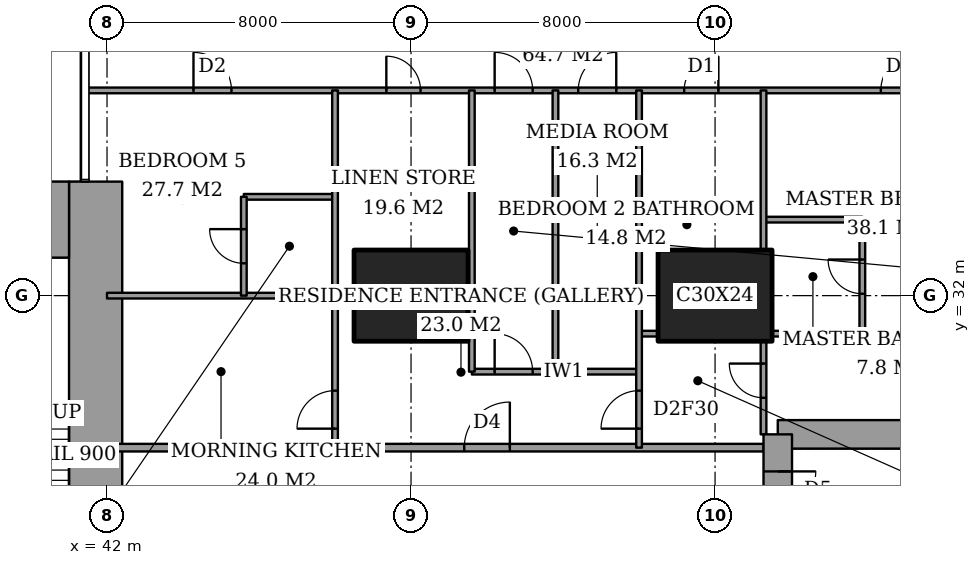
"""IFC4 building model, lengths in metres.
Left out: names, types, materials, properties, quantities, classifications, styles, units other than length and angle.
Written with IfcOpenShell. Run it as: python <this file> out.ifc"""

import sys

from ifc_helpers import new_model, si_unit, direction, frame, frame_2d, origin, origin_2d, place, context, subcontext, project, spatial, rectangle, extrude, element, fill, save


model = new_model("IFC4")
c1 = context("Model", 3, precision=1e-05, world=origin(), true_north=direction((0.0, 1.0)))
c2 = subcontext(c1, "Body", "Model", "MODEL_VIEW")
j1 = project(units=[si_unit("LENGTHUNIT", "METRE"), si_unit("PLANEANGLEUNIT", "RADIAN")], contexts=[c1])
p1 = place(None, origin())
s1 = spatial("IfcSite", under=j1, at=p1, CompositionType="ELEMENT")
p2 = place(p1, origin())
s2 = spatial("IfcBuilding", under=s1, at=p2, CompositionType="ELEMENT")
p3 = place(p2, frame((0.0, 0.0, 211.0)))
s3 = spatial("IfcBuildingStorey", under=s2, at=p3, CompositionType="ELEMENT", Elevation=211.0)
for number, where, z_axis, x_axis in (
    (1, (50.0, 32.0, 0.0), (0.0, 0.0, 1.0), (1.0, 0.0, 0.0)),
    (2, (58.0, 32.0, 0.0), (0.0, 0.0, 1.0), (1.0, 0.0, 0.0)),
):
    element("IfcColumn", number, at=place(p3, frame(where, z_axis=z_axis, x_axis=x_axis)), inside=s3, PredefinedType="COLUMN", context=c2, shape_type="SweptSolid", body=[
        extrude(rectangle(XDim=3.0, YDim=2.4, at=origin_2d()), origin(), (0.0, 0.0, 1.0), 3.6),
    ])
p4 = place(p3, frame((37.85, 34.0, 0.0), z_axis=(0.0, 0.0, 1.0), x_axis=(1.0, 0.0, 0.0)))
e3 = element("IfcWall", 3, at=p4, inside=s3, PredefinedType="SHEAR", context=c2, shape_type="SweptSolid", body=[
    extrude(rectangle(XDim=3.15, YDim=2.0, at=frame_2d((1.575, 0.0))), origin(), (0.0, 0.0, 1.0), 3.6),
])
p5 = place(p3, frame((41.7, 24.85, 0.0), z_axis=(0.0, 0.0, 1.0), x_axis=(0.0, 1.0, 0.0)))
e4 = element("IfcWall", 4, at=p5, inside=s3, PredefinedType="SHEAR", context=c2, shape_type="SweptSolid", body=[
    extrude(rectangle(XDim=10.15, YDim=1.4, at=frame_2d((5.075, 0.0))), origin(), (0.0, 0.0, 1.0), 3.6),
])
p6 = place(p3, frame((64.1, 28.35, 0.0), z_axis=(0.0, 0.0, 1.0), x_axis=(-1.0, 0.0, 0.0)))
e5 = element("IfcWall", 5, at=p6, inside=s3, PredefinedType="SHEAR", context=c2, shape_type="SweptSolid", body=[
    extrude(rectangle(XDim=4.45, YDim=0.75, at=frame_2d((2.225, 0.0))), origin(), (0.0, 0.0, 1.0), 3.6),
])
p7 = place(p3, frame((59.65, 28.35, 0.0), z_axis=(0.0, 0.0, 1.0), x_axis=(0.0, -1.0, 0.0)))
e6 = element("IfcWall", 6, at=p7, inside=s3, PredefinedType="SHEAR", context=c2, shape_type="SweptSolid", body=[
    extrude(rectangle(XDim=8.7, YDim=0.75, at=frame_2d((4.35, 0.0))), origin(), (0.0, 0.0, 1.0), 3.6),
])
p8 = place(p7, frame((0.975, 0.0, 0.0)))
e7 = element("IfcOpeningElement", 7, at=p8, cuts=e6, PredefinedType="OPENING", context=c2, shape_type="SweptSolid", body=[
    extrude(rectangle(XDim=1.0, YDim=2.1, at=frame_2d((0.5, 1.05))), frame((0.0, 0.385, 0.0), z_axis=(0.0, -1.0, 0.0), x_axis=(1.0, 0.0, 0.0)), (0.0, 0.0, 1.0), 0.77),
])
p9 = place(p3, frame((42.0, 28.0, 0.0), z_axis=(0.0, 0.0, 1.0), x_axis=(1.0, 0.0, 0.0)))
e8 = element("IfcWall", 8, at=p9, inside=s3, PredefinedType="PARTITIONING", context=c2, shape_type="SweptSolid", body=[
    extrude(rectangle(XDim=17.275, YDim=0.2, at=frame_2d((8.637, 0.0))), origin(), (0.0, 0.0, 1.0), 3.35),
])
p10 = place(p9, frame((9.4, 0.0, 0.0)))
e9 = element("IfcOpeningElement", 9, at=p10, cuts=e8, PredefinedType="OPENING", context=c2, shape_type="SweptSolid", body=[
    extrude(rectangle(XDim=1.2, YDim=2.4, at=frame_2d((0.6, 1.2))), frame((0.0, 0.11, 0.0), z_axis=(0.0, -1.0, 0.0), x_axis=(1.0, 0.0, 0.0)), (0.0, 0.0, 1.0), 0.22),
])
p11 = place(p3, frame((51.6, 30.0, 0.0), z_axis=(0.0, 0.0, 1.0), x_axis=(1.0, 0.0, 0.0)))
e10 = element("IfcWall", 10, at=p11, inside=s3, PredefinedType="PARTITIONING", context=c2, shape_type="SweptSolid", body=[
    extrude(rectangle(XDim=4.4, YDim=0.15, at=frame_2d((2.2, 0.0))), origin(), (0.0, 0.0, 1.0), 3.35),
])
p12 = place(p11, frame((0.6, 0.0, 0.0)))
e11 = element("IfcOpeningElement", 11, at=p12, cuts=e10, PredefinedType="OPENING", context=c2, shape_type="SweptSolid", body=[
    extrude(rectangle(XDim=1.0, YDim=2.1, at=frame_2d((0.5, 1.05))), frame((0.0, 0.085, 0.0), z_axis=(0.0, -1.0, 0.0), x_axis=(1.0, 0.0, 0.0)), (0.0, 0.0, 1.0), 0.17),
])
p13 = place(p3, frame((56.0, 31.0, 0.0), z_axis=(0.0, 0.0, 1.0), x_axis=(1.0, 0.0, 0.0)))
e12 = element("IfcWall", 12, at=p13, inside=s3, PredefinedType="PARTITIONING", context=c2, shape_type="SweptSolid", body=[
    extrude(rectangle(XDim=0.5, YDim=0.15, at=frame_2d((0.25, 0.0))), origin(), (0.0, 0.0, 1.0), 3.35),
])
p14 = place(p3, frame((59.5, 31.0, 0.0), z_axis=(0.0, 0.0, 1.0), x_axis=(1.0, 0.0, 0.0)))
e13 = element("IfcWall", 13, at=p14, inside=s3, PredefinedType="PARTITIONING", context=c2, shape_type="SweptSolid", body=[
    extrude(rectangle(XDim=6.95, YDim=0.15, at=frame_2d((3.475, 0.0))), origin(), (0.0, 0.0, 1.0), 3.35),
])
p15 = place(p3, frame((48.0, 31.95, 0.0), z_axis=(0.0, 0.0, 1.0), x_axis=(1.0, 0.0, 0.0)))
e14 = element("IfcWall", 14, at=p15, inside=s3, PredefinedType="PARTITIONING", context=c2, shape_type="SweptSolid", body=[
    extrude(rectangle(XDim=0.5, YDim=0.15, at=frame_2d((0.25, 0.0))), origin(), (0.0, 0.0, 1.0), 2.634),
])
p16 = place(p3, frame((42.0, 32.0, 0.0), z_axis=(0.0, 0.0, 1.0), x_axis=(1.0, 0.0, 0.0)))
e15 = element("IfcWall", 15, at=p16, inside=s3, PredefinedType="PARTITIONING", context=c2, shape_type="SweptSolid", body=[
    extrude(rectangle(XDim=6.0, YDim=0.15, at=frame_2d((3.0, 0.0))), origin(), (0.0, 0.0, 1.0), 2.634),
])
p17 = place(p3, frame((59.275, 34.0, 0.0), z_axis=(0.0, 0.0, 1.0), x_axis=(1.0, 0.0, 0.0)))
e16 = element("IfcWall", 16, at=p17, inside=s3, PredefinedType="PARTITIONING", context=c2, shape_type="SweptSolid", body=[
    extrude(rectangle(XDim=2.6, YDim=0.15, at=frame_2d((1.3, 0.0))), origin(), (0.0, 0.0, 1.0), 3.35),
])
p18 = place(p3, frame((45.6, 34.6, 0.0), z_axis=(0.0, 0.0, 1.0), x_axis=(1.0, 0.0, 0.0)))
e17 = element("IfcWall", 17, at=p18, inside=s3, PredefinedType="PARTITIONING", context=c2, shape_type="SweptSolid", body=[
    extrude(rectangle(XDim=2.4, YDim=0.15, at=frame_2d((1.2, 0.0))), origin(), (0.0, 0.0, 1.0), 3.35),
])
p19 = place(p3, frame((41.439, 37.4, 0.0), z_axis=(0.0, 0.0, 1.0), x_axis=(1.0, 0.0, 0.0)))
e18 = element("IfcWall", 18, at=p19, inside=s3, PredefinedType="PARTITIONING", context=c2, shape_type="SweptSolid", body=[
    extrude(rectangle(XDim=25.011, YDim=0.15, at=frame_2d((12.505, 0.0))), origin(), (0.0, 0.0, 1.0), 3.35),
])
p20 = place(p19, frame((10.761, 0.0, 0.0)))
e19 = element("IfcOpeningElement", 19, at=p20, cuts=e18, PredefinedType="OPENING", context=c2, shape_type="SweptSolid", body=[
    extrude(rectangle(XDim=1.0, YDim=2.1, at=frame_2d((0.5, 1.05))), frame((0.0, 0.085, 0.0), z_axis=(0.0, -1.0, 0.0), x_axis=(1.0, 0.0, 0.0)), (0.0, 0.0, 1.0), 0.17),
])
p21 = place(p19, frame((20.924, 0.0, 0.0)))
e20 = element("IfcOpeningElement", 20, at=p21, cuts=e18, PredefinedType="OPENING", context=c2, shape_type="SweptSolid", body=[
    extrude(rectangle(XDim=1.0, YDim=2.1, at=frame_2d((0.5, 1.05))), frame((0.0, 0.085, 0.0), z_axis=(0.0, -1.0, 0.0), x_axis=(1.0, 0.0, 0.0)), (0.0, 0.0, 1.0), 0.17),
])
p22 = place(p19, frame((15.749, 0.0, 0.0)))
e21 = element("IfcOpeningElement", 21, at=p22, cuts=e18, PredefinedType="OPENING", context=c2, shape_type="SweptSolid", body=[
    extrude(rectangle(XDim=0.9, YDim=2.1, at=frame_2d((0.45, 1.05))), frame((0.0, 0.085, 0.0), z_axis=(0.0, -1.0, 0.0), x_axis=(1.0, 0.0, 0.0)), (0.0, 0.0, 1.0), 0.17),
])
p23 = place(p19, frame((12.961, 0.0, 0.0)))
e22 = element("IfcOpeningElement", 22, at=p23, cuts=e18, PredefinedType="OPENING", context=c2, shape_type="SweptSolid", body=[
    extrude(rectangle(XDim=1.0, YDim=2.1, at=frame_2d((0.5, 1.05))), frame((0.0, 0.085, 0.0), z_axis=(0.0, -1.0, 0.0), x_axis=(1.0, 0.0, 0.0)), (0.0, 0.0, 1.0), 0.17),
])
p24 = place(p19, frame((7.911, 0.0, 0.0)))
e23 = element("IfcOpeningElement", 23, at=p24, cuts=e18, PredefinedType="OPENING", context=c2, shape_type="SweptSolid", body=[
    extrude(rectangle(XDim=0.9, YDim=2.1, at=frame_2d((0.45, 1.05))), frame((0.0, 0.085, 0.0), z_axis=(0.0, -1.0, 0.0), x_axis=(1.0, 0.0, 0.0)), (0.0, 0.0, 1.0), 0.17),
])
p25 = place(p19, frame((2.836, 0.0, 0.0)))
e24 = element("IfcOpeningElement", 24, at=p25, cuts=e18, PredefinedType="OPENING", context=c2, shape_type="SweptSolid", body=[
    extrude(rectangle(XDim=1.0, YDim=2.1, at=frame_2d((0.5, 1.05))), frame((0.0, 0.085, 0.0), z_axis=(0.0, -1.0, 0.0), x_axis=(1.0, 0.0, 0.0)), (0.0, 0.0, 1.0), 0.17),
])
p26 = place(p3, frame((45.6, 32.0, 0.0), z_axis=(0.0, 0.0, 1.0), x_axis=(0.0, 1.0, 0.0)))
e25 = element("IfcWall", 25, at=p26, inside=s3, PredefinedType="PARTITIONING", context=c2, shape_type="SweptSolid", body=[
    extrude(rectangle(XDim=2.6, YDim=0.15, at=frame_2d((1.3, 0.0))), origin(), (0.0, 0.0, 1.0), 3.35),
])
p27 = place(p26, frame((0.85, 0.0, 0.0)))
e26 = element("IfcOpeningElement", 26, at=p27, cuts=e25, PredefinedType="OPENING", context=c2, shape_type="SweptSolid", body=[
    extrude(rectangle(XDim=0.9, YDim=2.1, at=frame_2d((0.45, 1.05))), frame((0.0, 0.085, 0.0), z_axis=(0.0, -1.0, 0.0), x_axis=(1.0, 0.0, 0.0)), (0.0, 0.0, 1.0), 0.17),
])
p28 = place(p3, frame((48.0, 28.0, 0.0), z_axis=(0.0, 0.0, 1.0), x_axis=(0.0, 1.0, 0.0)))
e27 = element("IfcWall", 27, at=p28, inside=s3, PredefinedType="PARTITIONING", context=c2, shape_type="SweptSolid", body=[
    extrude(rectangle(XDim=9.4, YDim=0.15, at=frame_2d((4.7, 0.0))), origin(), (0.0, 0.0, 1.0), 3.35),
])
p29 = place(p28, frame((0.5, 0.0, 0.0)))
e28 = element("IfcOpeningElement", 28, at=p29, cuts=e27, PredefinedType="OPENING", context=c2, shape_type="SweptSolid", body=[
    extrude(rectangle(XDim=1.0, YDim=2.1, at=frame_2d((0.5, 1.05))), frame((0.0, 0.085, 0.0), z_axis=(0.0, -1.0, 0.0), x_axis=(1.0, 0.0, 0.0)), (0.0, 0.0, 1.0), 0.17),
])
for number, where, z_axis, x_axis in (
    (29, (51.6, 30.0, 0.0), (0.0, 0.0, 1.0), (0.0, 1.0, 0.0)),
    (30, (53.8, 30.0, 0.0), (0.0, 0.0, 1.0), (0.0, 1.0, 0.0)),
):
    element("IfcWall", number, at=place(p3, frame(where, z_axis=z_axis, x_axis=x_axis)), inside=s3, PredefinedType="PARTITIONING", context=c2, shape_type="SweptSolid", body=[
        extrude(rectangle(XDim=7.4, YDim=0.15, at=frame_2d((3.7, 0.0))), origin(), (0.0, 0.0, 1.0), 3.35),
    ])
p30 = place(p3, frame((56.0, 28.0, 0.0), z_axis=(0.0, 0.0, 1.0), x_axis=(0.0, 1.0, 0.0)))
e31 = element("IfcWall", 31, at=p30, inside=s3, PredefinedType="PARTITIONING", context=c2, shape_type="SweptSolid", body=[
    extrude(rectangle(XDim=9.4, YDim=0.15, at=frame_2d((4.7, 0.0))), origin(), (0.0, 0.0, 1.0), 3.35),
])
p31 = place(p30, frame((0.5, 0.0, 0.0)))
e32 = element("IfcOpeningElement", 32, at=p31, cuts=e31, PredefinedType="OPENING", context=c2, shape_type="SweptSolid", body=[
    extrude(rectangle(XDim=1.0, YDim=2.1, at=frame_2d((0.5, 1.05))), frame((0.0, 0.085, 0.0), z_axis=(0.0, -1.0, 0.0), x_axis=(1.0, 0.0, 0.0)), (0.0, 0.0, 1.0), 0.17),
])
p32 = place(p3, frame((59.275, 28.35, 0.0), z_axis=(0.0, 0.0, 1.0), x_axis=(0.0, 1.0, 0.0)))
e33 = element("IfcWall", 33, at=p32, inside=s3, PredefinedType="PARTITIONING", context=c2, shape_type="SweptSolid", body=[
    extrude(rectangle(XDim=2.45, YDim=0.15, at=frame_2d((1.225, 0.0))), origin(), (0.0, 0.0, 1.0), 3.35),
])
p33 = place(p32, frame((0.962, 0.0, 0.0)))
e34 = element("IfcOpeningElement", 34, at=p33, cuts=e33, PredefinedType="OPENING", context=c2, shape_type="SweptSolid", body=[
    extrude(rectangle(XDim=0.9, YDim=2.1, at=frame_2d((0.45, 1.05))), frame((0.0, 0.085, 0.0), z_axis=(0.0, -1.0, 0.0), x_axis=(1.0, 0.0, 0.0)), (0.0, 0.0, 1.0), 0.17),
])
p34 = place(p3, frame((59.275, 33.2, 0.0), z_axis=(0.0, 0.0, 1.0), x_axis=(0.0, 1.0, 0.0)))
e35 = element("IfcWall", 35, at=p34, inside=s3, PredefinedType="PARTITIONING", context=c2, shape_type="SweptSolid", body=[
    extrude(rectangle(XDim=4.2, YDim=0.15, at=frame_2d((2.1, 0.0))), origin(), (0.0, 0.0, 1.0), 3.35),
])
p35 = place(p3, frame((61.875, 31.0, 0.0), z_axis=(0.0, 0.0, 1.0), x_axis=(0.0, 1.0, 0.0)))
e36 = element("IfcWall", 36, at=p35, inside=s3, PredefinedType="PARTITIONING", context=c2, shape_type="SweptSolid", body=[
    extrude(rectangle(XDim=3.0, YDim=0.15, at=frame_2d((1.5, 0.0))), origin(), (0.0, 0.0, 1.0), 3.35),
])
p36 = place(p35, frame((1.05, 0.0, 0.0)))
e37 = element("IfcOpeningElement", 37, at=p36, cuts=e36, PredefinedType="OPENING", context=c2, shape_type="SweptSolid", body=[
    extrude(rectangle(XDim=0.9, YDim=2.1, at=frame_2d((0.45, 1.05))), frame((0.0, 0.085, 0.0), z_axis=(0.0, -1.0, 0.0), x_axis=(1.0, 0.0, 0.0)), (0.0, 0.0, 1.0), 0.17),
])
p37 = place(p20, origin())
e38 = element("IfcDoor", 38, at=p37, inside=s3, OperationType="SINGLE_SWING_RIGHT", PredefinedType="DOOR", context=c2, shape_type="SweptSolid", body=[
    extrude(rectangle(XDim=1.0, YDim=2.1, at=frame_2d((0.5, 1.05))), frame((0.0, 0.025, 0.0), z_axis=(0.0, -1.0, 0.0), x_axis=(1.0, 0.0, 0.0)), (0.0, 0.0, 1.0), 0.05),
])
fill(e19, e38)
p38 = place(p36, origin())
e39 = element("IfcDoor", 39, at=p38, inside=s3, OperationType="SINGLE_SWING_LEFT", PredefinedType="DOOR", context=c2, shape_type="SweptSolid", body=[
    extrude(rectangle(XDim=0.9, YDim=2.1, at=frame_2d((0.45, 1.05))), frame((0.0, 0.025, 0.0), z_axis=(0.0, -1.0, 0.0), x_axis=(1.0, 0.0, 0.0)), (0.0, 0.0, 1.0), 0.05),
])
fill(e37, e39)
p39 = place(p21, origin())
e40 = element("IfcDoor", 40, at=p39, inside=s3, OperationType="SINGLE_SWING_LEFT", PredefinedType="DOOR", context=c2, shape_type="SweptSolid", body=[
    extrude(rectangle(XDim=1.0, YDim=2.1, at=frame_2d((0.5, 1.05))), frame((0.0, 0.025, 0.0), z_axis=(0.0, -1.0, 0.0), x_axis=(1.0, 0.0, 0.0)), (0.0, 0.0, 1.0), 0.05),
])
fill(e20, e40)
p40 = place(p33, origin())
e41 = element("IfcDoor", 41, at=p40, inside=s3, OperationType="SINGLE_SWING_LEFT", PredefinedType="DOOR", context=c2, shape_type="SweptSolid", body=[
    extrude(rectangle(XDim=0.9, YDim=2.1, at=frame_2d((0.45, 1.05))), frame((0.0, 0.025, 0.0), z_axis=(0.0, -1.0, 0.0), x_axis=(1.0, 0.0, 0.0)), (0.0, 0.0, 1.0), 0.05),
])
fill(e34, e41)
p41 = place(p22, origin())
e42 = element("IfcDoor", 42, at=p41, inside=s3, OperationType="SINGLE_SWING_LEFT", PredefinedType="DOOR", context=c2, shape_type="SweptSolid", body=[
    extrude(rectangle(XDim=0.9, YDim=2.1, at=frame_2d((0.45, 1.05))), frame((0.0, 0.025, 0.0), z_axis=(0.0, -1.0, 0.0), x_axis=(1.0, 0.0, 0.0)), (0.0, 0.0, 1.0), 0.05),
])
fill(e21, e42)
p42 = place(p31, origin())
e43 = element("IfcDoor", 43, at=p42, inside=s3, OperationType="SINGLE_SWING_RIGHT", PredefinedType="DOOR", context=c2, shape_type="SweptSolid", body=[
    extrude(rectangle(XDim=1.0, YDim=2.1, at=frame_2d((0.5, 1.05))), frame((0.0, 0.025, 0.0), z_axis=(0.0, -1.0, 0.0), x_axis=(1.0, 0.0, 0.0)), (0.0, 0.0, 1.0), 0.05),
])
fill(e32, e43)
p43 = place(p10, origin())
e44 = element("IfcDoor", 44, at=p43, inside=s3, OperationType="SINGLE_SWING_LEFT", PredefinedType="DOOR", context=c2, shape_type="SweptSolid", body=[
    extrude(rectangle(XDim=1.2, YDim=2.4, at=frame_2d((0.6, 1.2))), frame((0.0, 0.025, 0.0), z_axis=(0.0, -1.0, 0.0), x_axis=(1.0, 0.0, 0.0)), (0.0, 0.0, 1.0), 0.05),
])
fill(e9, e44)
p44 = place(p23, origin())
e45 = element("IfcDoor", 45, at=p44, inside=s3, OperationType="SINGLE_SWING_LEFT", PredefinedType="DOOR", context=c2, shape_type="SweptSolid", body=[
    extrude(rectangle(XDim=1.0, YDim=2.1, at=frame_2d((0.5, 1.05))), frame((0.0, 0.025, 0.0), z_axis=(0.0, -1.0, 0.0), x_axis=(1.0, 0.0, 0.0)), (0.0, 0.0, 1.0), 0.05),
])
fill(e22, e45)
p45 = place(p12, origin())
e46 = element("IfcDoor", 46, at=p45, inside=s3, OperationType="SINGLE_SWING_RIGHT", PredefinedType="DOOR", context=c2, shape_type="SweptSolid", body=[
    extrude(rectangle(XDim=1.0, YDim=2.1, at=frame_2d((0.5, 1.05))), frame((0.0, 0.025, 0.0), z_axis=(0.0, -1.0, 0.0), x_axis=(1.0, 0.0, 0.0)), (0.0, 0.0, 1.0), 0.05),
])
fill(e11, e46)
p46 = place(p24, origin())
e47 = element("IfcDoor", 47, at=p46, inside=s3, OperationType="SINGLE_SWING_RIGHT", PredefinedType="DOOR", context=c2, shape_type="SweptSolid", body=[
    extrude(rectangle(XDim=0.9, YDim=2.1, at=frame_2d((0.45, 1.05))), frame((0.0, 0.025, 0.0), z_axis=(0.0, -1.0, 0.0), x_axis=(1.0, 0.0, 0.0)), (0.0, 0.0, 1.0), 0.05),
])
fill(e23, e47)
p47 = place(p27, origin())
e48 = element("IfcDoor", 48, at=p47, inside=s3, OperationType="SINGLE_SWING_LEFT", PredefinedType="DOOR", context=c2, shape_type="SweptSolid", body=[
    extrude(rectangle(XDim=0.9, YDim=2.1, at=frame_2d((0.45, 1.05))), frame((0.0, 0.025, 0.0), z_axis=(0.0, -1.0, 0.0), x_axis=(1.0, 0.0, 0.0)), (0.0, 0.0, 1.0), 0.05),
])
fill(e26, e48)
p48 = place(p25, origin())
e49 = element("IfcDoor", 49, at=p48, inside=s3, OperationType="SINGLE_SWING_RIGHT", PredefinedType="DOOR", context=c2, shape_type="SweptSolid", body=[
    extrude(rectangle(XDim=1.0, YDim=2.1, at=frame_2d((0.5, 1.05))), frame((0.0, 0.025, 0.0), z_axis=(0.0, -1.0, 0.0), x_axis=(1.0, 0.0, 0.0)), (0.0, 0.0, 1.0), 0.05),
])
fill(e24, e49)
p49 = place(p29, origin())
e50 = element("IfcDoor", 50, at=p49, inside=s3, OperationType="SINGLE_SWING_RIGHT", PredefinedType="DOOR", context=c2, shape_type="SweptSolid", body=[
    extrude(rectangle(XDim=1.0, YDim=2.1, at=frame_2d((0.5, 1.05))), frame((0.0, 0.025, 0.0), z_axis=(0.0, -1.0, 0.0), x_axis=(1.0, 0.0, 0.0)), (0.0, 0.0, 1.0), 0.05),
])
fill(e28, e50)
p50 = place(p8, origin())
e51 = element("IfcDoor", 51, at=p50, inside=s3, OperationType="SINGLE_SWING_RIGHT", PredefinedType="DOOR", context=c2, shape_type="SweptSolid", body=[
    extrude(rectangle(XDim=1.0, YDim=2.1, at=frame_2d((0.5, 1.05))), frame((0.0, 0.025, 0.0), z_axis=(0.0, -1.0, 0.0), x_axis=(1.0, 0.0, 0.0)), (0.0, 0.0, 1.0), 0.05),
])
fill(e7, e51)
save(model, sys.argv[1])
